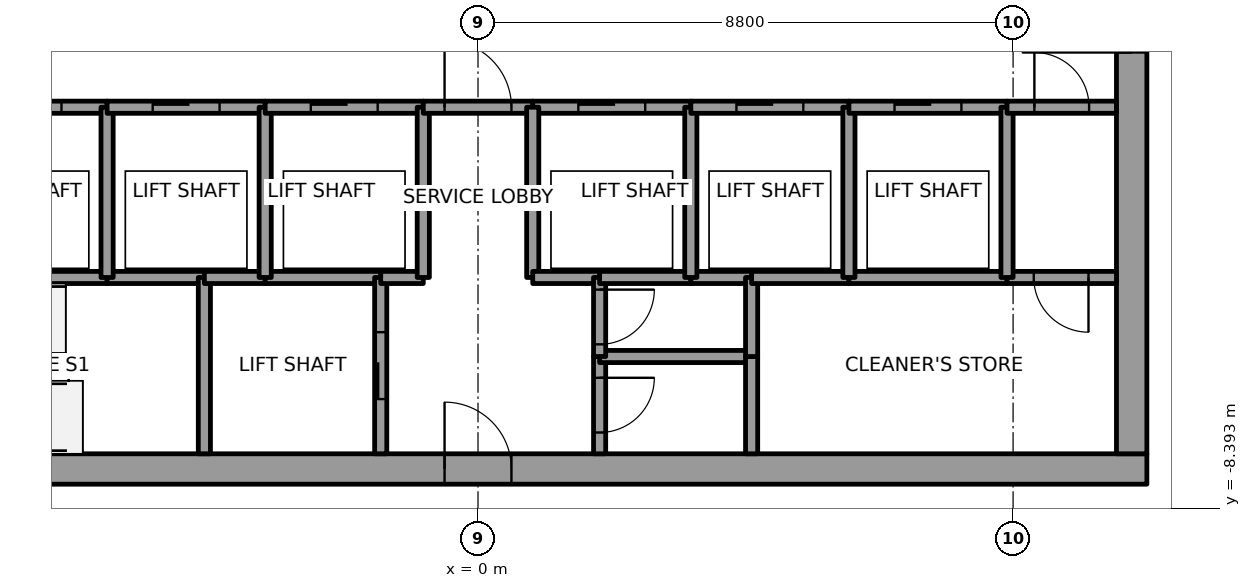
"""IFC4 building model, lengths in metres.
Left out: names, types, materials, properties, quantities, classifications, styles, units other than length and angle.
Written with IfcOpenShell. Run it as: python <this file> out.ifc"""

import sys

from ifc_helpers import new_model, si_unit, direction, frame, frame_2d, origin, place, context, subcontext, project, spatial, rectangle, extrude, element, fill, save


model = new_model("IFC4")
c1 = context("Model", 3, precision=1e-05, world=origin(), true_north=direction((0.0, 1.0)))
c2 = subcontext(c1, "Body", "Model", "MODEL_VIEW")
j1 = project(units=[si_unit("LENGTHUNIT", "METRE"), si_unit("PLANEANGLEUNIT", "RADIAN")], contexts=[c1])
p1 = place(None, origin())
s1 = spatial("IfcSite", under=j1, at=p1, CompositionType="ELEMENT")
p2 = place(p1, origin())
s2 = spatial("IfcBuilding", under=s1, at=p2, CompositionType="ELEMENT")
p3 = place(p2, frame((0.0, 0.0, 219.8)))
s3 = spatial("IfcBuildingStorey", under=s2, at=p3, CompositionType="ELEMENT", Elevation=219.8)
p4 = place(p3, frame((-11.0, -7.75, 0.0), z_axis=(0.0, 0.0, 1.0), x_axis=(1.0, 0.0, 0.0)))
e1 = element("IfcWall", 1, at=p4, inside=s3, PredefinedType="SHEAR", context=c2, shape_type="SweptSolid", body=[
    extrude(rectangle(XDim=22.0, YDim=0.5, at=frame_2d((11.0, 0.0))), origin(), (0.0, 0.0, 1.0), 7.2),
])
p5 = place(p4, frame((10.45, 0.0, 0.0)))
e2 = element("IfcOpeningElement", 2, at=p5, cuts=e1, PredefinedType="OPENING", context=c2, shape_type="SweptSolid", body=[
    extrude(rectangle(XDim=1.1, YDim=2.1, at=frame_2d((0.55, 1.05))), frame((0.0, 0.25, 0.0), z_axis=(0.0, -1.0, 0.0), x_axis=(1.0, 0.0, 0.0)), (0.0, 0.0, 1.0), 0.5),
])
p6 = place(p3, frame((10.75, -7.5, 0.0), z_axis=(0.0, 0.0, 1.0), x_axis=(0.0, 1.0, 0.0)))
e3 = element("IfcWall", 3, at=p6, inside=s3, PredefinedType="SHEAR", context=c2, shape_type="SweptSolid", body=[
    extrude(rectangle(XDim=15.0, YDim=0.5, at=frame_2d((7.5, 0.0))), origin(), (0.0, 0.0, 1.0), 7.2),
])
p7 = place(p6, frame((6.6, 0.0, 0.0)))
e4 = element("IfcOpeningElement", 4, at=p7, cuts=e3, PredefinedType="OPENING", context=c2, shape_type="SweptSolid", body=[
    extrude(rectangle(XDim=1.8, YDim=2.1, at=frame_2d((0.9, 1.05))), frame((0.0, 0.25, 0.0), z_axis=(0.0, -1.0, 0.0), x_axis=(1.0, 0.0, 0.0)), (0.0, 0.0, 1.0), 0.5),
])
p8 = place(p3, frame((-8.7, -4.6, 0.0), z_axis=(0.0, 0.0, 1.0), x_axis=(1.0, 0.0, 0.0)))
e5 = element("IfcWall", 5, at=p8, inside=s3, PredefinedType="SOLIDWALL", context=c2, shape_type="SweptSolid", body=[
    extrude(rectangle(XDim=2.6, YDim=0.2, at=frame_2d((1.3, 0.0))), origin(), (0.0, 0.0, 1.0), 7.05),
])
p9 = place(p3, frame((-8.7, -1.8, 0.0), z_axis=(0.0, 0.0, 1.0), x_axis=(1.0, 0.0, 0.0)))
e6 = element("IfcWall", 6, at=p9, inside=s3, PredefinedType="SOLIDWALL", context=c2, shape_type="SweptSolid", body=[
    extrude(rectangle(XDim=2.6, YDim=0.2, at=frame_2d((1.3, 0.0))), origin(), (0.0, 0.0, 1.0), 7.05),
])
p10 = place(p9, frame((0.75, 0.0, 0.0)))
e7 = element("IfcOpeningElement", 7, at=p10, cuts=e6, PredefinedType="OPENING", context=c2, shape_type="SweptSolid", body=[
    extrude(rectangle(XDim=1.1, YDim=2.1, at=frame_2d((0.55, 1.05))), frame((0.0, 0.1, 0.0), z_axis=(0.0, -1.0, 0.0), x_axis=(1.0, 0.0, 0.0)), (0.0, 0.0, 1.0), 0.2),
])
p11 = place(p3, frame((-6.1, -4.6, 0.0), z_axis=(0.0, 0.0, 1.0), x_axis=(1.0, 0.0, 0.0)))
e8 = element("IfcWall", 8, at=p11, inside=s3, PredefinedType="SOLIDWALL", context=c2, shape_type="SweptSolid", body=[
    extrude(rectangle(XDim=1.6, YDim=0.2, at=frame_2d((0.8, 0.0))), origin(), (0.0, 0.0, 1.0), 7.05),
])
p12 = place(p3, frame((-6.1, -4.6, 0.0), z_axis=(0.0, 0.0, 1.0), x_axis=(0.0, 1.0, 0.0)))
e9 = element("IfcWall", 9, at=p12, inside=s3, PredefinedType="SOLIDWALL", context=c2, shape_type="SweptSolid", body=[
    extrude(rectangle(XDim=2.8, YDim=0.2, at=frame_2d((1.4, 0.0))), origin(), (0.0, 0.0, 1.0), 7.05),
])
p13 = place(p3, frame((-6.1, -1.8, 0.0), z_axis=(0.0, 0.0, 1.0), x_axis=(1.0, 0.0, 0.0)))
e10 = element("IfcWall", 10, at=p13, inside=s3, PredefinedType="SOLIDWALL", context=c2, shape_type="SweptSolid", body=[
    extrude(rectangle(XDim=2.6, YDim=0.2, at=frame_2d((1.3, 0.0))), origin(), (0.0, 0.0, 1.0), 7.05),
])
p14 = place(p13, frame((0.75, 0.0, 0.0)))
e11 = element("IfcOpeningElement", 11, at=p14, cuts=e10, PredefinedType="OPENING", context=c2, shape_type="SweptSolid", body=[
    extrude(rectangle(XDim=1.1, YDim=2.1, at=frame_2d((0.55, 1.05))), frame((0.0, 0.1, 0.0), z_axis=(0.0, -1.0, 0.0), x_axis=(1.0, 0.0, 0.0)), (0.0, 0.0, 1.0), 0.2),
])
p15 = place(p3, frame((-4.5, -4.6, 0.0), z_axis=(0.0, 0.0, 1.0), x_axis=(0.0, -1.0, 0.0)))
e12 = element("IfcWall", 12, at=p15, inside=s3, PredefinedType="SOLIDWALL", context=c2, shape_type="SweptSolid", body=[
    extrude(rectangle(XDim=2.9, YDim=0.2, at=frame_2d((1.45, 0.0))), origin(), (0.0, 0.0, 1.0), 7.05),
])
p16 = place(p3, frame((-4.5, -4.6, 0.0), z_axis=(0.0, 0.0, 1.0), x_axis=(1.0, 0.0, 0.0)))
e13 = element("IfcWall", 13, at=p16, inside=s3, PredefinedType="SOLIDWALL", context=c2, shape_type="SweptSolid", body=[
    extrude(rectangle(XDim=1.0, YDim=0.2, at=frame_2d((0.5, 0.0))), origin(), (0.0, 0.0, 1.0), 7.05),
])
p17 = place(p3, frame((-3.5, -4.6, 0.0), z_axis=(0.0, 0.0, 1.0), x_axis=(1.0, 0.0, 0.0)))
e14 = element("IfcWall", 14, at=p17, inside=s3, PredefinedType="SOLIDWALL", context=c2, shape_type="SweptSolid", body=[
    extrude(rectangle(XDim=1.9, YDim=0.2, at=frame_2d((0.95, 0.0))), origin(), (0.0, 0.0, 1.0), 7.05),
])
p18 = place(p3, frame((-3.5, -4.6, 0.0), z_axis=(0.0, 0.0, 1.0), x_axis=(0.0, 1.0, 0.0)))
e15 = element("IfcWall", 15, at=p18, inside=s3, PredefinedType="SOLIDWALL", context=c2, shape_type="SweptSolid", body=[
    extrude(rectangle(XDim=2.8, YDim=0.2, at=frame_2d((1.4, 0.0))), origin(), (0.0, 0.0, 1.0), 7.05),
])
p19 = place(p3, frame((-3.5, -1.8, 0.0), z_axis=(0.0, 0.0, 1.0), x_axis=(1.0, 0.0, 0.0)))
e16 = element("IfcWall", 16, at=p19, inside=s3, PredefinedType="SOLIDWALL", context=c2, shape_type="SweptSolid", body=[
    extrude(rectangle(XDim=2.6, YDim=0.2, at=frame_2d((1.3, 0.0))), origin(), (0.0, 0.0, 1.0), 7.05),
])
p20 = place(p19, frame((0.75, 0.0, 0.0)))
e17 = element("IfcOpeningElement", 17, at=p20, cuts=e16, PredefinedType="OPENING", context=c2, shape_type="SweptSolid", body=[
    extrude(rectangle(XDim=1.1, YDim=2.1, at=frame_2d((0.55, 1.05))), frame((0.0, 0.1, 0.0), z_axis=(0.0, -1.0, 0.0), x_axis=(1.0, 0.0, 0.0)), (0.0, 0.0, 1.0), 0.2),
])
p21 = place(p3, frame((-1.6, -7.5, 0.0), z_axis=(0.0, 0.0, 1.0), x_axis=(0.0, 1.0, 0.0)))
e18 = element("IfcWall", 18, at=p21, inside=s3, PredefinedType="SOLIDWALL", context=c2, shape_type="SweptSolid", body=[
    extrude(rectangle(XDim=2.9, YDim=0.2, at=frame_2d((1.45, 0.0))), origin(), (0.0, 0.0, 1.0), 7.05),
])
p22 = place(p21, frame((0.9, 0.0, 0.0)))
e19 = element("IfcOpeningElement", 19, at=p22, cuts=e18, PredefinedType="OPENING", context=c2, shape_type="SweptSolid", body=[
    extrude(rectangle(XDim=1.1, YDim=2.1, at=frame_2d((0.55, 1.05))), frame((0.0, 0.1, 0.0), z_axis=(0.0, -1.0, 0.0), x_axis=(1.0, 0.0, 0.0)), (0.0, 0.0, 1.0), 0.2),
])
p23 = place(p3, frame((-1.6, -4.6, 0.0), z_axis=(0.0, 0.0, 1.0), x_axis=(1.0, 0.0, 0.0)))
e20 = element("IfcWall", 20, at=p23, inside=s3, PredefinedType="SOLIDWALL", context=c2, shape_type="SweptSolid", body=[
    extrude(rectangle(XDim=0.7, YDim=0.2, at=frame_2d((0.35, 0.0))), origin(), (0.0, 0.0, 1.0), 7.05),
])
p24 = place(p3, frame((-0.9, -4.6, 0.0), z_axis=(0.0, 0.0, 1.0), x_axis=(0.0, 1.0, 0.0)))
e21 = element("IfcWall", 21, at=p24, inside=s3, PredefinedType="SOLIDWALL", context=c2, shape_type="SweptSolid", body=[
    extrude(rectangle(XDim=2.8, YDim=0.2, at=frame_2d((1.4, 0.0))), origin(), (0.0, 0.0, 1.0), 7.05),
])
p25 = place(p3, frame((-0.9, -1.8, 0.0), z_axis=(0.0, 0.0, 1.0), x_axis=(1.0, 0.0, 0.0)))
e22 = element("IfcWall", 22, at=p25, inside=s3, PredefinedType="SOLIDWALL", context=c2, shape_type="SweptSolid", body=[
    extrude(rectangle(XDim=1.8, YDim=0.2, at=frame_2d((0.9, 0.0))), origin(), (0.0, 0.0, 1.0), 7.05),
])
p26 = place(p25, frame((0.35, 0.0, 0.0)))
e23 = element("IfcOpeningElement", 23, at=p26, cuts=e22, PredefinedType="OPENING", context=c2, shape_type="SweptSolid", body=[
    extrude(rectangle(XDim=1.1, YDim=2.1, at=frame_2d((0.55, 1.05))), frame((0.0, 0.1, 0.0), z_axis=(0.0, -1.0, 0.0), x_axis=(1.0, 0.0, 0.0)), (0.0, 0.0, 1.0), 0.2),
])
p27 = place(p3, frame((0.9, -1.8, 0.0), z_axis=(0.0, 0.0, 1.0), x_axis=(1.0, 0.0, 0.0)))
e24 = element("IfcWall", 24, at=p27, inside=s3, PredefinedType="SOLIDWALL", context=c2, shape_type="SweptSolid", body=[
    extrude(rectangle(XDim=2.6, YDim=0.2, at=frame_2d((1.3, 0.0))), origin(), (0.0, 0.0, 1.0), 7.05),
])
p28 = place(p27, frame((0.75, 0.0, 0.0)))
e25 = element("IfcOpeningElement", 25, at=p28, cuts=e24, PredefinedType="OPENING", context=c2, shape_type="SweptSolid", body=[
    extrude(rectangle(XDim=1.1, YDim=2.1, at=frame_2d((0.55, 1.05))), frame((0.0, 0.1, 0.0), z_axis=(0.0, -1.0, 0.0), x_axis=(1.0, 0.0, 0.0)), (0.0, 0.0, 1.0), 0.2),
])
p29 = place(p3, frame((0.9, -1.8, 0.0), z_axis=(0.0, 0.0, 1.0), x_axis=(0.0, -1.0, 0.0)))
e26 = element("IfcWall", 26, at=p29, inside=s3, PredefinedType="SOLIDWALL", context=c2, shape_type="SweptSolid", body=[
    extrude(rectangle(XDim=2.8, YDim=0.2, at=frame_2d((1.4, 0.0))), origin(), (0.0, 0.0, 1.0), 7.05),
])
p30 = place(p3, frame((0.9, -4.6, 0.0), z_axis=(0.0, 0.0, 1.0), x_axis=(1.0, 0.0, 0.0)))
e27 = element("IfcWall", 27, at=p30, inside=s3, PredefinedType="SOLIDWALL", context=c2, shape_type="SweptSolid", body=[
    extrude(rectangle(XDim=1.1, YDim=0.2, at=frame_2d((0.55, 0.0))), origin(), (0.0, 0.0, 1.0), 7.05),
])
p31 = place(p3, frame((2.0, -5.9, 0.0), z_axis=(0.0, 0.0, 1.0), x_axis=(0.0, -1.0, 0.0)))
e28 = element("IfcWall", 28, at=p31, inside=s3, PredefinedType="SOLIDWALL", context=c2, shape_type="SweptSolid", body=[
    extrude(rectangle(XDim=1.6, YDim=0.2, at=frame_2d((0.8, 0.0))), origin(), (0.0, 0.0, 1.0), 7.05),
])
p32 = place(p31, frame((0.35, 0.0, 0.0)))
e29 = element("IfcOpeningElement", 29, at=p32, cuts=e28, PredefinedType="OPENING", context=c2, shape_type="SweptSolid", body=[
    extrude(rectangle(XDim=0.9, YDim=2.1, at=frame_2d((0.45, 1.05))), frame((0.0, 0.1, 0.0), z_axis=(0.0, -1.0, 0.0), x_axis=(1.0, 0.0, 0.0)), (0.0, 0.0, 1.0), 0.2),
])
p33 = place(p3, frame((4.5, -5.9, 0.0), z_axis=(0.0, 0.0, 1.0), x_axis=(-1.0, 0.0, 0.0)))
e30 = element("IfcWall", 30, at=p33, inside=s3, PredefinedType="SOLIDWALL", context=c2, shape_type="SweptSolid", body=[
    extrude(rectangle(XDim=2.5, YDim=0.2, at=frame_2d((1.25, 0.0))), origin(), (0.0, 0.0, 1.0), 7.05),
])
p34 = place(p3, frame((2.0, -4.6, 0.0), z_axis=(0.0, 0.0, 1.0), x_axis=(0.0, -1.0, 0.0)))
e31 = element("IfcWall", 31, at=p34, inside=s3, PredefinedType="SOLIDWALL", context=c2, shape_type="SweptSolid", body=[
    extrude(rectangle(XDim=1.3, YDim=0.2, at=frame_2d((0.65, 0.0))), origin(), (0.0, 0.0, 1.0), 7.05),
])
p35 = place(p34, frame((0.2, 0.0, 0.0)))
e32 = element("IfcOpeningElement", 32, at=p35, cuts=e31, PredefinedType="OPENING", context=c2, shape_type="SweptSolid", body=[
    extrude(rectangle(XDim=0.9, YDim=2.1, at=frame_2d((0.45, 1.05))), frame((0.0, 0.1, 0.0), z_axis=(0.0, -1.0, 0.0), x_axis=(1.0, 0.0, 0.0)), (0.0, 0.0, 1.0), 0.2),
])
p36 = place(p3, frame((3.5, -4.6, 0.0), z_axis=(0.0, 0.0, 1.0), x_axis=(-1.0, 0.0, 0.0)))
e33 = element("IfcWall", 33, at=p36, inside=s3, PredefinedType="SOLIDWALL", context=c2, shape_type="SweptSolid", body=[
    extrude(rectangle(XDim=1.5, YDim=0.2, at=frame_2d((0.75, 0.0))), origin(), (0.0, 0.0, 1.0), 7.05),
])
p37 = place(p3, frame((4.5, -4.6, 0.0), z_axis=(0.0, 0.0, 1.0), x_axis=(-1.0, 0.0, 0.0)))
e34 = element("IfcWall", 34, at=p37, inside=s3, PredefinedType="SOLIDWALL", context=c2, shape_type="SweptSolid", body=[
    extrude(rectangle(XDim=1.0, YDim=0.2, at=frame_2d((0.5, 0.0))), origin(), (0.0, 0.0, 1.0), 7.05),
])
p38 = place(p3, frame((3.5, -4.6, 0.0), z_axis=(0.0, 0.0, 1.0), x_axis=(0.0, 1.0, 0.0)))
e35 = element("IfcWall", 35, at=p38, inside=s3, PredefinedType="SOLIDWALL", context=c2, shape_type="SweptSolid", body=[
    extrude(rectangle(XDim=2.8, YDim=0.2, at=frame_2d((1.4, 0.0))), origin(), (0.0, 0.0, 1.0), 7.05),
])
p39 = place(p3, frame((3.5, -1.8, 0.0), z_axis=(0.0, 0.0, 1.0), x_axis=(1.0, 0.0, 0.0)))
e36 = element("IfcWall", 36, at=p39, inside=s3, PredefinedType="SOLIDWALL", context=c2, shape_type="SweptSolid", body=[
    extrude(rectangle(XDim=2.6, YDim=0.2, at=frame_2d((1.3, 0.0))), origin(), (0.0, 0.0, 1.0), 7.05),
])
p40 = place(p39, frame((0.75, 0.0, 0.0)))
e37 = element("IfcOpeningElement", 37, at=p40, cuts=e36, PredefinedType="OPENING", context=c2, shape_type="SweptSolid", body=[
    extrude(rectangle(XDim=1.1, YDim=2.1, at=frame_2d((0.55, 1.05))), frame((0.0, 0.1, 0.0), z_axis=(0.0, -1.0, 0.0), x_axis=(1.0, 0.0, 0.0)), (0.0, 0.0, 1.0), 0.2),
])
p41 = place(p3, frame((4.5, -5.9, 0.0), z_axis=(0.0, 0.0, 1.0), x_axis=(0.0, -1.0, 0.0)))
e38 = element("IfcWall", 38, at=p41, inside=s3, PredefinedType="SOLIDWALL", context=c2, shape_type="SweptSolid", body=[
    extrude(rectangle(XDim=1.6, YDim=0.2, at=frame_2d((0.8, 0.0))), origin(), (0.0, 0.0, 1.0), 7.05),
])
p42 = place(p3, frame((4.5, -4.6, 0.0), z_axis=(0.0, 0.0, 1.0), x_axis=(0.0, -1.0, 0.0)))
e39 = element("IfcWall", 39, at=p42, inside=s3, PredefinedType="SOLIDWALL", context=c2, shape_type="SweptSolid", body=[
    extrude(rectangle(XDim=1.3, YDim=0.2, at=frame_2d((0.65, 0.0))), origin(), (0.0, 0.0, 1.0), 7.05),
])
p43 = place(p3, frame((6.1, -4.6, 0.0), z_axis=(0.0, 0.0, 1.0), x_axis=(-1.0, 0.0, 0.0)))
e40 = element("IfcWall", 40, at=p43, inside=s3, PredefinedType="SOLIDWALL", context=c2, shape_type="SweptSolid", body=[
    extrude(rectangle(XDim=1.6, YDim=0.2, at=frame_2d((0.8, 0.0))), origin(), (0.0, 0.0, 1.0), 7.05),
])
p44 = place(p3, frame((8.7, -4.6, 0.0), z_axis=(0.0, 0.0, 1.0), x_axis=(-1.0, 0.0, 0.0)))
e41 = element("IfcWall", 41, at=p44, inside=s3, PredefinedType="SOLIDWALL", context=c2, shape_type="SweptSolid", body=[
    extrude(rectangle(XDim=2.6, YDim=0.2, at=frame_2d((1.3, 0.0))), origin(), (0.0, 0.0, 1.0), 7.05),
])
p45 = place(p3, frame((6.1, -4.6, 0.0), z_axis=(0.0, 0.0, 1.0), x_axis=(0.0, 1.0, 0.0)))
e42 = element("IfcWall", 42, at=p45, inside=s3, PredefinedType="SOLIDWALL", context=c2, shape_type="SweptSolid", body=[
    extrude(rectangle(XDim=2.8, YDim=0.2, at=frame_2d((1.4, 0.0))), origin(), (0.0, 0.0, 1.0), 7.05),
])
p46 = place(p3, frame((6.1, -1.8, 0.0), z_axis=(0.0, 0.0, 1.0), x_axis=(1.0, 0.0, 0.0)))
e43 = element("IfcWall", 43, at=p46, inside=s3, PredefinedType="SOLIDWALL", context=c2, shape_type="SweptSolid", body=[
    extrude(rectangle(XDim=2.6, YDim=0.2, at=frame_2d((1.3, 0.0))), origin(), (0.0, 0.0, 1.0), 7.05),
])
p47 = place(p46, frame((0.75, 0.0, 0.0)))
e44 = element("IfcOpeningElement", 44, at=p47, cuts=e43, PredefinedType="OPENING", context=c2, shape_type="SweptSolid", body=[
    extrude(rectangle(XDim=1.1, YDim=2.1, at=frame_2d((0.55, 1.05))), frame((0.0, 0.1, 0.0), z_axis=(0.0, -1.0, 0.0), x_axis=(1.0, 0.0, 0.0)), (0.0, 0.0, 1.0), 0.2),
])
p48 = place(p3, frame((10.5, -4.6, 0.0), z_axis=(0.0, 0.0, 1.0), x_axis=(-1.0, 0.0, 0.0)))
e45 = element("IfcWall", 45, at=p48, inside=s3, PredefinedType="SOLIDWALL", context=c2, shape_type="SweptSolid", body=[
    extrude(rectangle(XDim=1.8, YDim=0.2, at=frame_2d((0.9, 0.0))), origin(), (0.0, 0.0, 1.0), 7.05),
])
p49 = place(p48, frame((0.46, 0.0, 0.0)))
e46 = element("IfcOpeningElement", 46, at=p49, cuts=e45, PredefinedType="OPENING", context=c2, shape_type="SweptSolid", body=[
    extrude(rectangle(XDim=0.9, YDim=2.1, at=frame_2d((0.45, 1.05))), frame((0.0, 0.1, 0.0), z_axis=(0.0, -1.0, 0.0), x_axis=(1.0, 0.0, 0.0)), (0.0, 0.0, 1.0), 0.2),
])
p50 = place(p3, frame((8.7, -1.8, 0.0), z_axis=(0.0, 0.0, 1.0), x_axis=(0.0, -1.0, 0.0)))
e47 = element("IfcWall", 47, at=p50, inside=s3, PredefinedType="SOLIDWALL", context=c2, shape_type="SweptSolid", body=[
    extrude(rectangle(XDim=2.8, YDim=0.2, at=frame_2d((1.4, 0.0))), origin(), (0.0, 0.0, 1.0), 7.05),
])
p51 = place(p3, frame((8.7, -1.8, 0.0), z_axis=(0.0, 0.0, 1.0), x_axis=(1.0, 0.0, 0.0)))
e48 = element("IfcWall", 48, at=p51, inside=s3, PredefinedType="SOLIDWALL", context=c2, shape_type="SweptSolid", body=[
    extrude(rectangle(XDim=1.8, YDim=0.2, at=frame_2d((0.9, 0.0))), origin(), (0.0, 0.0, 1.0), 7.05),
])
p52 = place(p51, frame((0.45, 0.0, 0.0)))
e49 = element("IfcOpeningElement", 49, at=p52, cuts=e48, PredefinedType="OPENING", context=c2, shape_type="SweptSolid", body=[
    extrude(rectangle(XDim=0.9, YDim=2.1, at=frame_2d((0.45, 1.05))), frame((0.0, 0.1, 0.0), z_axis=(0.0, -1.0, 0.0), x_axis=(1.0, 0.0, 0.0)), (0.0, 0.0, 1.0), 0.2),
])
p53 = place(p10, origin())
e50 = element("IfcDoor", 50, at=p53, inside=s3, OperationType="SLIDING_TO_LEFT", PredefinedType="DOOR", context=c2, shape_type="SweptSolid", body=[
    extrude(rectangle(XDim=1.1, YDim=2.1, at=frame_2d((0.55, 1.05))), frame((0.0, 0.025, 0.0), z_axis=(0.0, -1.0, 0.0), x_axis=(1.0, 0.0, 0.0)), (0.0, 0.0, 1.0), 0.05),
])
fill(e7, e50)
p54 = place(p14, origin())
e51 = element("IfcDoor", 51, at=p54, inside=s3, OperationType="SLIDING_TO_LEFT", PredefinedType="DOOR", context=c2, shape_type="SweptSolid", body=[
    extrude(rectangle(XDim=1.1, YDim=2.1, at=frame_2d((0.55, 1.05))), frame((0.0, 0.025, 0.0), z_axis=(0.0, -1.0, 0.0), x_axis=(1.0, 0.0, 0.0)), (0.0, 0.0, 1.0), 0.05),
])
fill(e11, e51)
p55 = place(p20, origin())
e52 = element("IfcDoor", 52, at=p55, inside=s3, OperationType="SLIDING_TO_LEFT", PredefinedType="DOOR", context=c2, shape_type="SweptSolid", body=[
    extrude(rectangle(XDim=1.1, YDim=2.1, at=frame_2d((0.55, 1.05))), frame((0.0, 0.025, 0.0), z_axis=(0.0, -1.0, 0.0), x_axis=(1.0, 0.0, 0.0)), (0.0, 0.0, 1.0), 0.05),
])
fill(e17, e52)
p56 = place(p28, origin())
e53 = element("IfcDoor", 53, at=p56, inside=s3, OperationType="SLIDING_TO_LEFT", PredefinedType="DOOR", context=c2, shape_type="SweptSolid", body=[
    extrude(rectangle(XDim=1.1, YDim=2.1, at=frame_2d((0.55, 1.05))), frame((0.0, 0.025, 0.0), z_axis=(0.0, -1.0, 0.0), x_axis=(1.0, 0.0, 0.0)), (0.0, 0.0, 1.0), 0.05),
])
fill(e25, e53)
p57 = place(p40, origin())
e54 = element("IfcDoor", 54, at=p57, inside=s3, OperationType="SLIDING_TO_LEFT", PredefinedType="DOOR", context=c2, shape_type="SweptSolid", body=[
    extrude(rectangle(XDim=1.1, YDim=2.1, at=frame_2d((0.55, 1.05))), frame((0.0, 0.025, 0.0), z_axis=(0.0, -1.0, 0.0), x_axis=(1.0, 0.0, 0.0)), (0.0, 0.0, 1.0), 0.05),
])
fill(e37, e54)
p58 = place(p47, origin())
e55 = element("IfcDoor", 55, at=p58, inside=s3, OperationType="SLIDING_TO_LEFT", PredefinedType="DOOR", context=c2, shape_type="SweptSolid", body=[
    extrude(rectangle(XDim=1.1, YDim=2.1, at=frame_2d((0.55, 1.05))), frame((0.0, 0.025, 0.0), z_axis=(0.0, -1.0, 0.0), x_axis=(1.0, 0.0, 0.0)), (0.0, 0.0, 1.0), 0.05),
])
fill(e44, e55)
p59 = place(p22, origin())
e56 = element("IfcDoor", 56, at=p59, inside=s3, OperationType="SLIDING_TO_RIGHT", PredefinedType="DOOR", context=c2, shape_type="SweptSolid", body=[
    extrude(rectangle(XDim=1.1, YDim=2.1, at=frame_2d((0.55, 1.05))), frame((0.0, 0.025, 0.0), z_axis=(0.0, -1.0, 0.0), x_axis=(1.0, 0.0, 0.0)), (0.0, 0.0, 1.0), 0.05),
])
fill(e19, e56)
p60 = place(p26, origin())
e57 = element("IfcDoor", 57, at=p60, inside=s3, OperationType="SINGLE_SWING_LEFT", PredefinedType="DOOR", context=c2, shape_type="SweptSolid", body=[
    extrude(rectangle(XDim=1.1, YDim=2.1, at=frame_2d((0.55, 1.05))), frame((0.0, 0.025, 0.0), z_axis=(0.0, -1.0, 0.0), x_axis=(1.0, 0.0, 0.0)), (0.0, 0.0, 1.0), 0.05),
])
fill(e23, e57)
p61 = place(p49, origin())
e58 = element("IfcDoor", 58, at=p61, inside=s3, OperationType="SINGLE_SWING_LEFT", PredefinedType="DOOR", context=c2, shape_type="SweptSolid", body=[
    extrude(rectangle(XDim=0.9, YDim=2.1, at=frame_2d((0.45, 1.05))), frame((0.0, 0.025, 0.0), z_axis=(0.0, -1.0, 0.0), x_axis=(1.0, 0.0, 0.0)), (0.0, 0.0, 1.0), 0.05),
])
fill(e46, e58)
p62 = place(p52, origin())
e59 = element("IfcDoor", 59, at=p62, inside=s3, OperationType="SINGLE_SWING_RIGHT", PredefinedType="DOOR", context=c2, shape_type="SweptSolid", body=[
    extrude(rectangle(XDim=0.9, YDim=2.1, at=frame_2d((0.45, 1.05))), frame((0.0, 0.025, 0.0), z_axis=(0.0, -1.0, 0.0), x_axis=(1.0, 0.0, 0.0)), (0.0, 0.0, 1.0), 0.05),
])
fill(e49, e59)
p63 = place(p32, origin())
e60 = element("IfcDoor", 60, at=p63, inside=s3, OperationType="SINGLE_SWING_RIGHT", PredefinedType="DOOR", context=c2, shape_type="SweptSolid", body=[
    extrude(rectangle(XDim=0.9, YDim=2.1, at=frame_2d((0.45, 1.05))), frame((0.0, 0.025, 0.0), z_axis=(0.0, -1.0, 0.0), x_axis=(1.0, 0.0, 0.0)), (0.0, 0.0, 1.0), 0.05),
])
fill(e29, e60)
p64 = place(p35, origin())
e61 = element("IfcDoor", 61, at=p64, inside=s3, OperationType="SINGLE_SWING_RIGHT", PredefinedType="DOOR", context=c2, shape_type="SweptSolid", body=[
    extrude(rectangle(XDim=0.9, YDim=2.1, at=frame_2d((0.45, 1.05))), frame((0.0, 0.025, 0.0), z_axis=(0.0, -1.0, 0.0), x_axis=(1.0, 0.0, 0.0)), (0.0, 0.0, 1.0), 0.05),
])
fill(e32, e61)
p65 = place(p7, origin())
e62 = element("IfcDoor", 62, at=p65, inside=s3, OperationType="DOUBLE_DOOR_SINGLE_SWING", PredefinedType="DOOR", context=c2, shape_type="SweptSolid", body=[
    extrude(rectangle(XDim=1.8, YDim=2.1, at=frame_2d((0.9, 1.05))), frame((0.0, 0.025, 0.0), z_axis=(0.0, -1.0, 0.0), x_axis=(1.0, 0.0, 0.0)), (0.0, 0.0, 1.0), 0.05),
])
fill(e4, e62)
p66 = place(p5, origin())
e63 = element("IfcDoor", 63, at=p66, inside=s3, OperationType="SINGLE_SWING_LEFT", PredefinedType="DOOR", context=c2, shape_type="SweptSolid", body=[
    extrude(rectangle(XDim=1.1, YDim=2.1, at=frame_2d((0.55, 1.05))), frame((0.0, 0.025, 0.0), z_axis=(0.0, -1.0, 0.0), x_axis=(1.0, 0.0, 0.0)), (0.0, 0.0, 1.0), 0.05),
])
fill(e2, e63)
save(model, sys.argv[1])
